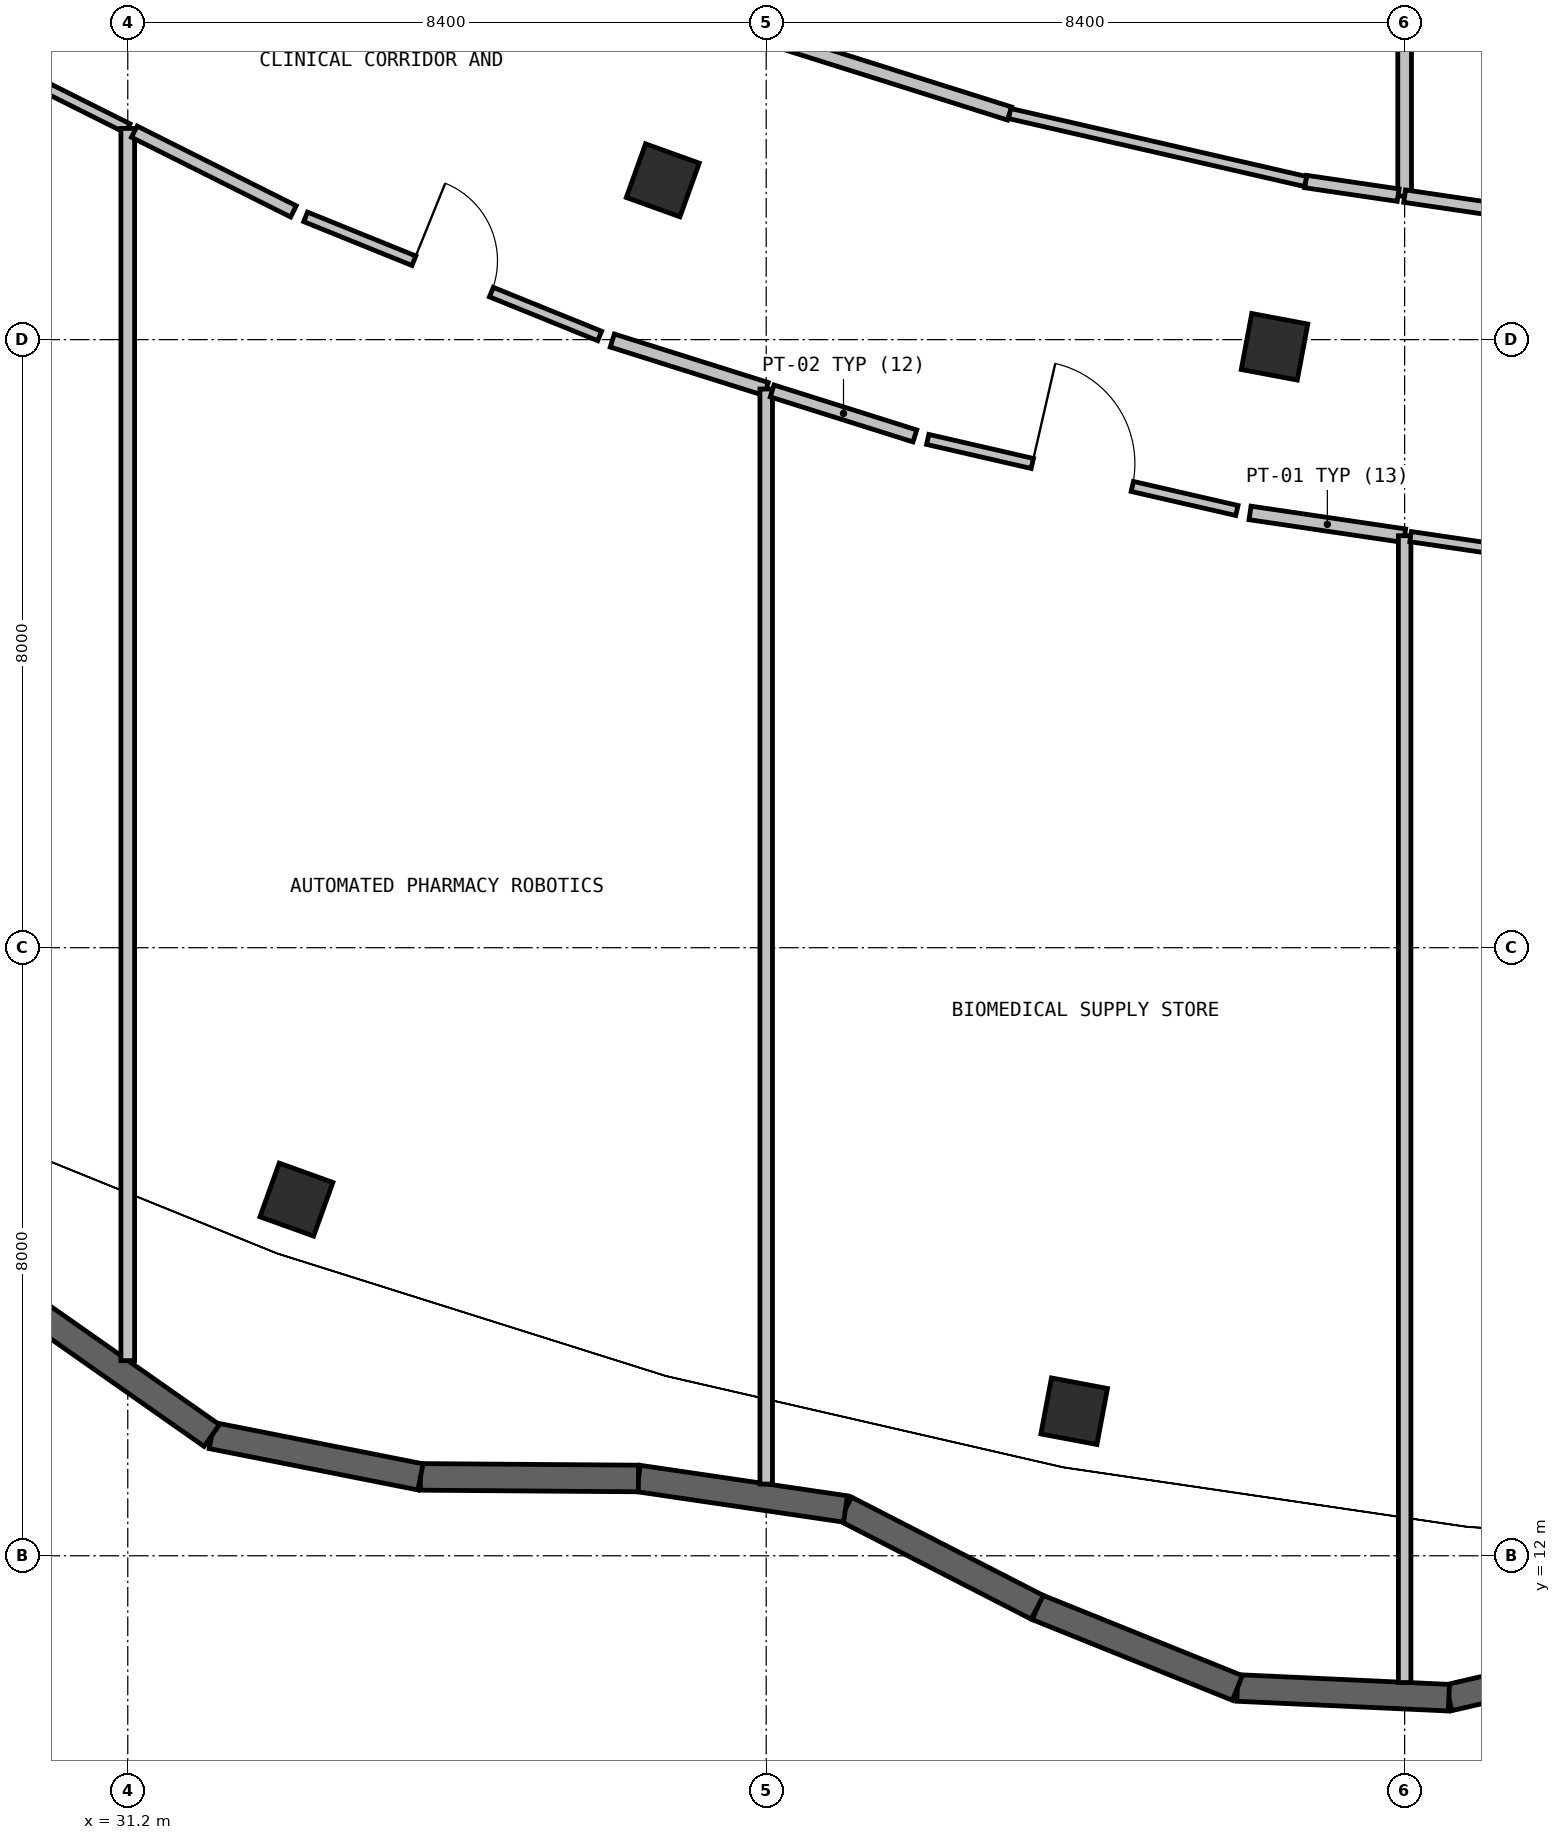
"""IFC4 building model, lengths in metres.
Left out: names, types, materials, properties, quantities, classifications, styles, units other than length and angle.
Written with IfcOpenShell. Run it as: python <this file> out.ifc"""

import sys

from ifc_helpers import new_model, si_unit, direction, frame, frame_2d, origin, origin_2d, place, context, subcontext, project, spatial, rectangle, extrude, element, fill, save


model = new_model("IFC4")
c1 = context("Model", 3, precision=1e-05, world=origin(), true_north=direction((0.0, 1.0)))
c2 = subcontext(c1, "Body", "Model", "MODEL_VIEW")
j1 = project(units=[si_unit("LENGTHUNIT", "METRE"), si_unit("PLANEANGLEUNIT", "RADIAN")], contexts=[c1])
p1 = place(None, origin())
s1 = spatial("IfcSite", under=j1, at=p1, CompositionType="ELEMENT")
p2 = place(p1, origin())
s2 = spatial("IfcBuilding", under=s1, at=p2, CompositionType="ELEMENT")
p3 = place(p2, frame((0.0, 0.0, -4.8)))
s3 = spatial("IfcBuildingStorey", under=s2, at=p3, CompositionType="ELEMENT", Elevation=-4.8)
for number, where, z_axis, x_axis in (
    (1, (38.239, 30.096, 0.0), (0.0, 0.0, 1.0), (0.338, 0.941, 0.0)),
    (2, (33.419, 16.686, 0.0), (0.0, 0.0, 1.0), (0.338, 0.941, 0.0)),
    (3, (46.288, 27.906, 0.0), (0.0, 0.0, 1.0), (0.185, 0.983, 0.0)),
    (4, (43.652, 13.902, 0.0), (0.0, 0.0, 1.0), (0.185, 0.983, 0.0)),
):
    element("IfcColumn", number, at=place(p3, frame(where, z_axis=z_axis, x_axis=x_axis)), inside=s3, PredefinedType="COLUMN", context=c2, shape_type="SweptSolid", body=[
        extrude(rectangle(XDim=0.75, YDim=0.75, at=origin_2d()), origin(), (0.0, 0.0, 1.0), 4.8),
    ])
p4 = place(p3, frame((51.41, 10.787, 0.0), z_axis=(0.0, 0.0, 1.0), x_axis=(-0.974280502406, -0.225338639899, 0.0)))
e5 = element("IfcWall", 5, at=p4, inside=s3, PredefinedType="SHEAR", context=c2, shape_type="SweptSolid", body=[
    extrude(rectangle(XDim=2.903, YDim=0.35, at=frame_2d((1.451, 0.0))), origin(), (0.0, 0.0, 1.0), 4.45),
])
p5 = place(p3, frame((48.582, 10.133, 0.0), z_axis=(0.0, 0.0, 1.0), x_axis=(-0.998945099637, 0.045920451988, 0.0)))
e6 = element("IfcWall", 6, at=p5, inside=s3, PredefinedType="SHEAR", context=c2, shape_type="SweptSolid", body=[
    extrude(rectangle(XDim=2.786, YDim=0.35, at=frame_2d((1.393, 0.0))), origin(), (0.0, 0.0, 1.0), 4.45),
])
p6 = place(p3, frame((45.799, 10.261, 0.0), z_axis=(0.0, 0.0, 1.0), x_axis=(-0.927476599419, 0.37388120778, 0.0)))
e7 = element("IfcWall", 7, at=p6, inside=s3, PredefinedType="SHEAR", context=c2, shape_type="SweptSolid", body=[
    extrude(rectangle(XDim=2.838, YDim=0.35, at=frame_2d((1.419, 0.0))), origin(), (0.0, 0.0, 1.0), 4.45),
])
p7 = place(p3, frame((43.167, 11.322, 0.0), z_axis=(0.0, 0.0, 1.0), x_axis=(-0.88987122719, 0.456211791846, 0.0)))
e8 = element("IfcWall", 8, at=p7, inside=s3, PredefinedType="SHEAR", context=c2, shape_type="SweptSolid", body=[
    extrude(rectangle(XDim=2.836, YDim=0.35, at=frame_2d((1.418, 0.0))), origin(), (0.0, 0.0, 1.0), 4.45),
])
p8 = place(p3, frame((40.643, 12.616, 0.0), z_axis=(0.0, 0.0, 1.0), x_axis=(-0.989332090641, 0.145677776028, 0.0)))
e9 = element("IfcWall", 9, at=p8, inside=s3, PredefinedType="SHEAR", context=c2, shape_type="SweptSolid", body=[
    extrude(rectangle(XDim=2.753, YDim=0.35, at=frame_2d((1.377, 0.0))), origin(), (0.0, 0.0, 1.0), 4.45),
])
p9 = place(p3, frame((37.919, 13.017, 0.0), z_axis=(0.0, 0.0, 1.0), x_axis=(-0.999973202424, 0.007320821947, 0.0)))
e10 = element("IfcWall", 10, at=p9, inside=s3, PredefinedType="SHEAR", context=c2, shape_type="SweptSolid", body=[
    extrude(rectangle(XDim=2.868, YDim=0.35, at=frame_2d((1.434, 0.0))), origin(), (0.0, 0.0, 1.0), 4.45),
])
p10 = place(p3, frame((35.051, 13.038, 0.0), z_axis=(0.0, 0.0, 1.0), x_axis=(-0.980941260915, 0.194304510074, 0.0)))
e11 = element("IfcWall", 11, at=p10, inside=s3, PredefinedType="SHEAR", context=c2, shape_type="SweptSolid", body=[
    extrude(rectangle(XDim=2.8, YDim=0.35, at=frame_2d((1.4, 0.0))), origin(), (0.0, 0.0, 1.0), 4.45),
])
p11 = place(p3, frame((32.305, 13.582, 0.0), z_axis=(0.0, 0.0, 1.0), x_axis=(-0.818653879161, 0.574287233129, 0.0)))
e12 = element("IfcWall", 12, at=p11, inside=s3, PredefinedType="SHEAR", context=c2, shape_type="SweptSolid", body=[
    extrude(rectangle(XDim=2.859, YDim=0.35, at=frame_2d((1.43, 0.0))), origin(), (0.0, 0.0, 1.0), 4.45),
])
p12 = place(p3, frame((29.648, 31.556, 0.0), z_axis=(0.0, 0.0, 1.0), x_axis=(0.894230168264, -0.447607424165, 0.0)))
e13 = element("IfcWall", 13, at=p12, inside=s3, PredefinedType="PARTITIONING", context=c2, shape_type="SweptSolid", body=[
    extrude(rectangle(XDim=1.736, YDim=0.135, at=frame_2d((0.868, 0.0))), origin(), (0.0, 0.0, 1.0), 4.45),
])
p13 = place(p3, frame((31.2, 30.779, 0.0), z_axis=(0.0, 0.0, 1.0), x_axis=(0.0, -1.0, 0.0)))
e14 = element("IfcWall", 14, at=p13, inside=s3, PredefinedType="PARTITIONING", context=c2, shape_type="SweptSolid", body=[
    extrude(rectangle(XDim=16.212, YDim=0.18, at=frame_2d((8.106, 0.0))), origin(), (0.0, 0.0, 1.0), 4.45),
])
p14 = place(p3, frame((31.286, 30.736, 0.0), z_axis=(0.0, 0.0, 1.0), x_axis=(0.894072491739, -0.447922291827, 0.0)))
e15 = element("IfcWall", 15, at=p14, inside=s3, PredefinedType="PARTITIONING", context=c2, shape_type="SweptSolid", body=[
    extrude(rectangle(XDim=2.342, YDim=0.165, at=frame_2d((1.171, 0.0))), origin(), (0.0, 0.0, 1.0), 4.45),
])
p15 = place(p3, frame((33.54, 29.615, 0.0), z_axis=(0.0, 0.0, 1.0), x_axis=(0.926870756001, -0.375380609075, 0.0)))
e16 = element("IfcWall", 16, at=p15, inside=s3, PredefinedType="PARTITIONING", context=c2, shape_type="SweptSolid", body=[
    extrude(rectangle(XDim=4.174, YDim=0.135, at=frame_2d((2.087, 0.0))), origin(), (0.0, 0.0, 1.0), 4.45),
])
p16 = place(p15, frame((1.537, 0.0, 0.0)))
e17 = element("IfcOpeningElement", 17, at=p16, cuts=e16, PredefinedType="OPENING", context=c2, shape_type="SweptSolid", body=[
    extrude(rectangle(XDim=1.1, YDim=2.15, at=frame_2d((0.55, 1.075))), frame((0.0, 0.077, 0.0), z_axis=(0.0, -1.0, 0.0), x_axis=(1.0, 0.0, 0.0)), (0.0, 0.0, 1.0), 0.155),
])
p17 = place(p3, frame((37.575, 27.988, 0.0), z_axis=(0.0, 0.0, 1.0), x_axis=(0.953796174372, -0.300454418762, 0.0)))
e18 = element("IfcWall", 18, at=p17, inside=s3, PredefinedType="PARTITIONING", context=c2, shape_type="SweptSolid", body=[
    extrude(rectangle(XDim=2.123, YDim=0.18, at=frame_2d((1.062, 0.0))), origin(), (0.0, 0.0, 1.0), 4.45),
])
p18 = place(p3, frame((39.6, 27.35, 0.0), z_axis=(0.0, 0.0, 1.0), x_axis=(0.0, -1.0, 0.0)))
e19 = element("IfcWall", 19, at=p18, inside=s3, PredefinedType="PARTITIONING", context=c2, shape_type="SweptSolid", body=[
    extrude(rectangle(XDim=14.407, YDim=0.165, at=frame_2d((7.204, 0.0))), origin(), (0.0, 0.0, 1.0), 4.45),
])
p19 = place(p3, frame((39.678, 27.325, 0.0), z_axis=(0.0, 0.0, 1.0), x_axis=(0.953726845655, -0.300674415069, 0.0)))
e20 = element("IfcWall", 20, at=p19, inside=s3, PredefinedType="PARTITIONING", context=c2, shape_type="SweptSolid", body=[
    extrude(rectangle(XDim=1.969, YDim=0.165, at=frame_2d((0.984, 0.0))), origin(), (0.0, 0.0, 1.0), 4.45),
])
p20 = place(p3, frame((41.725, 26.687, 0.0), z_axis=(0.0, 0.0, 1.0), x_axis=(0.974584054813, -0.224022141996, 0.0)))
e21 = element("IfcWall", 21, at=p20, inside=s3, PredefinedType="PARTITIONING", context=c2, shape_type="SweptSolid", body=[
    extrude(rectangle(XDim=4.174, YDim=0.135, at=frame_2d((2.087, 0.0))), origin(), (0.0, 0.0, 1.0), 4.45),
])
p21 = place(p20, frame((1.412, 0.0, 0.0)))
e22 = element("IfcOpeningElement", 22, at=p21, cuts=e21, PredefinedType="OPENING", context=c2, shape_type="SweptSolid", body=[
    extrude(rectangle(XDim=1.35, YDim=2.15, at=frame_2d((0.675, 1.075))), frame((0.0, 0.077, 0.0), z_axis=(0.0, -1.0, 0.0), x_axis=(1.0, 0.0, 0.0)), (0.0, 0.0, 1.0), 0.155),
])
p22 = place(p3, frame((45.966, 25.72, 0.0), z_axis=(0.0, 0.0, 1.0), x_axis=(0.989293174374, -0.145941821067, 0.0)))
e23 = element("IfcWall", 23, at=p22, inside=s3, PredefinedType="PARTITIONING", context=c2, shape_type="SweptSolid", body=[
    extrude(rectangle(XDim=2.056, YDim=0.18, at=frame_2d((1.028, 0.0))), origin(), (0.0, 0.0, 1.0), 4.45),
])
p23 = place(p3, frame((48.0, 25.42, 0.0), z_axis=(0.0, 0.0, 1.0), x_axis=(0.0, -1.0, 0.0)))
e24 = element("IfcWall", 24, at=p23, inside=s3, PredefinedType="PARTITIONING", context=c2, shape_type="SweptSolid", body=[
    extrude(rectangle(XDim=15.088, YDim=0.165, at=frame_2d((7.544, 0.0))), origin(), (0.0, 0.0, 1.0), 4.45),
])
p24 = place(p3, frame((48.0, 45.056, 0.0), z_axis=(0.0, 0.0, 1.0), x_axis=(0.0, -1.0, 0.0)))
e25 = element("IfcWall", 25, at=p24, inside=s3, PredefinedType="PARTITIONING", context=c2, shape_type="SweptSolid", body=[
    extrude(rectangle(XDim=15.168, YDim=0.18, at=frame_2d((7.584, 0.0))), origin(), (0.0, 0.0, 1.0), 3.75),
])
p25 = place(p3, frame((47.914, 29.901, 0.0), z_axis=(0.0, 0.0, 1.0), x_axis=(-0.989333072423, 0.145671108357, 0.0)))
e26 = element("IfcWall", 26, at=p25, inside=s3, PredefinedType="PARTITIONING", context=c2, shape_type="SweptSolid", body=[
    extrude(rectangle(XDim=1.23, YDim=0.165, at=frame_2d((0.615, 0.0))), origin(), (0.0, 0.0, 1.0), 4.45),
])
p26 = place(p3, frame((46.697, 30.08, 0.0), z_axis=(0.0, 0.0, 1.0), x_axis=(-0.974613054852, 0.223895943044, 0.0)))
e27 = element("IfcWall", 27, at=p26, inside=s3, PredefinedType="PARTITIONING", context=c2, shape_type="SweptSolid", body=[
    extrude(rectangle(XDim=3.998, YDim=0.135, at=frame_2d((1.999, 0.0))), origin(), (0.0, 0.0, 1.0), 4.45),
])
p27 = place(p3, frame((42.801, 30.975, 0.0), z_axis=(0.0, 0.0, 1.0), x_axis=(-0.953756214308, 0.300581243042, 0.0)))
e28 = element("IfcWall", 28, at=p27, inside=s3, PredefinedType="PARTITIONING", context=c2, shape_type="SweptSolid", body=[
    extrude(rectangle(XDim=3.356, YDim=0.18, at=frame_2d((1.678, 0.0))), origin(), (0.0, 0.0, 1.0), 4.45),
])
p28 = place(p3, frame((48.078, 25.408, 0.0), z_axis=(0.0, 0.0, 1.0), x_axis=(0.989410787297, -0.145142323191, 0.0)))
e29 = element("IfcWall", 29, at=p28, inside=s3, PredefinedType="PARTITIONING", context=c2, shape_type="SweptSolid", body=[
    extrude(rectangle(XDim=2.039, YDim=0.135, at=frame_2d((1.019, 0.0))), origin(), (0.0, 0.0, 1.0), 4.45),
])
p29 = place(p3, frame((50.652, 29.497, 0.0), z_axis=(0.0, 0.0, 1.0), x_axis=(-0.989313203243, 0.145805987148, 0.0)))
e30 = element("IfcWall", 30, at=p29, inside=s3, PredefinedType="PARTITIONING", context=c2, shape_type="SweptSolid", body=[
    extrude(rectangle(XDim=2.681, YDim=0.165, at=frame_2d((1.34, 0.0))), origin(), (0.0, 0.0, 1.0), 4.45),
])
p30 = place(p16, origin())
e31 = element("IfcDoor", 31, at=p30, inside=s3, OperationType="SINGLE_SWING_LEFT", PredefinedType="DOOR", context=c2, shape_type="SweptSolid", body=[
    extrude(rectangle(XDim=1.1, YDim=2.15, at=frame_2d((0.55, 1.075))), frame((0.0, 0.025, 0.0), z_axis=(0.0, -1.0, 0.0), x_axis=(1.0, 0.0, 0.0)), (0.0, 0.0, 1.0), 0.05),
])
fill(e17, e31)
p31 = place(p21, origin())
e32 = element("IfcDoor", 32, at=p31, inside=s3, OperationType="SINGLE_SWING_LEFT", PredefinedType="DOOR", context=c2, shape_type="SweptSolid", body=[
    extrude(rectangle(XDim=1.35, YDim=2.15, at=frame_2d((0.675, 1.075))), frame((0.0, 0.025, 0.0), z_axis=(0.0, -1.0, 0.0), x_axis=(1.0, 0.0, 0.0)), (0.0, 0.0, 1.0), 0.05),
])
fill(e22, e32)
save(model, sys.argv[1])
